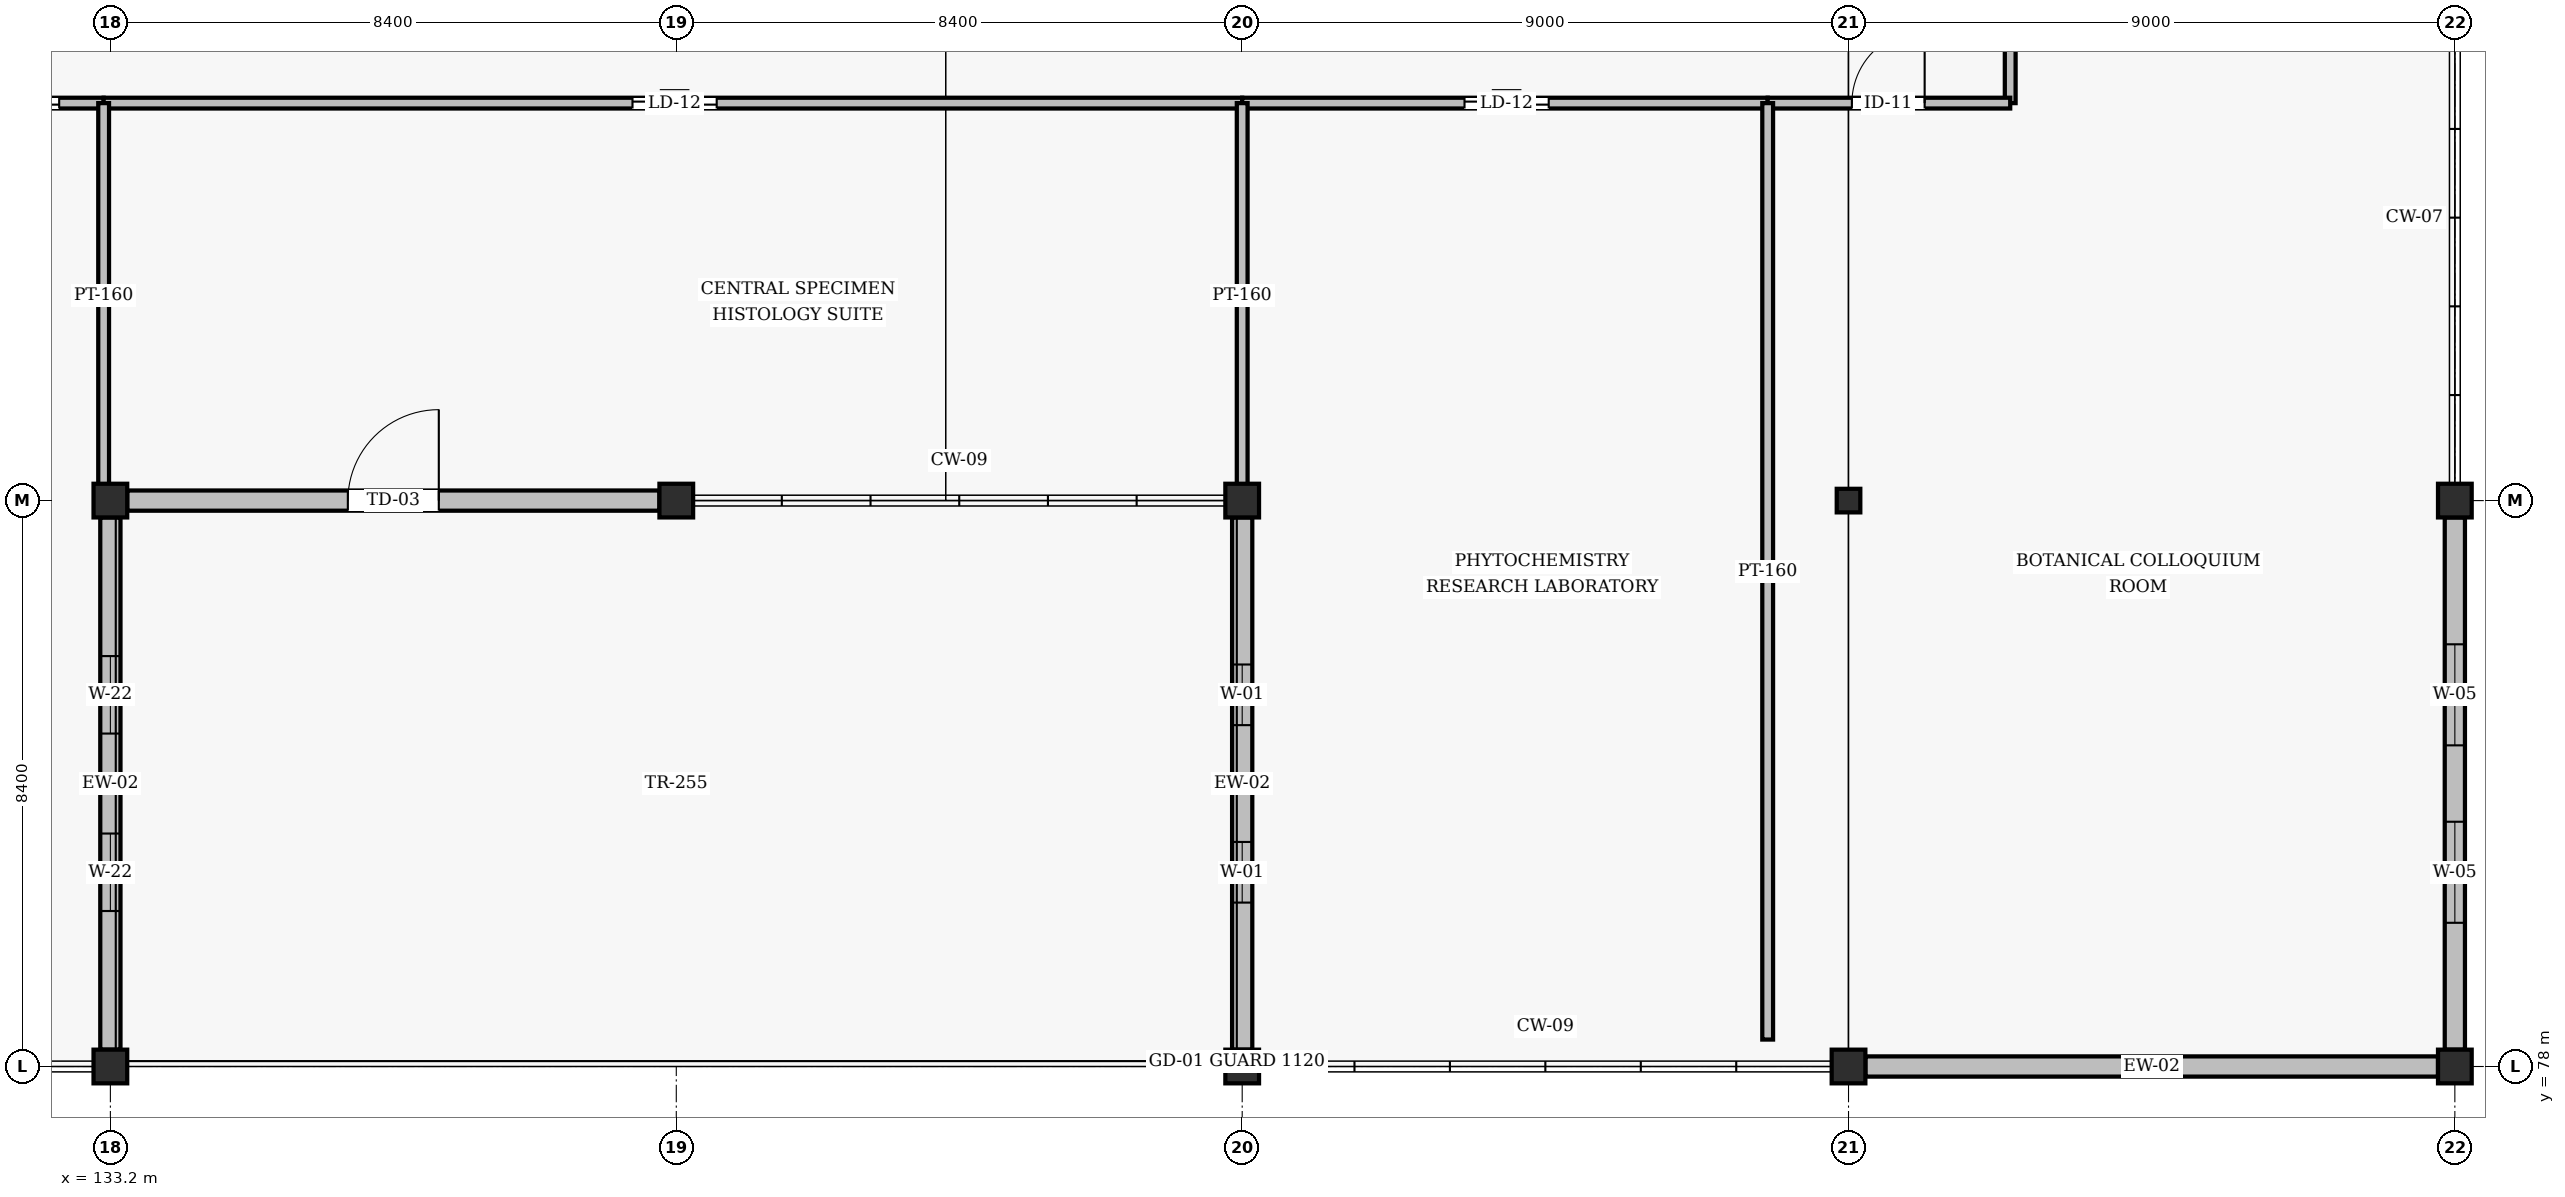
"""IFC4 building model, lengths in metres.
Left out: names, types, materials, properties, quantities, classifications, styles, units other than length and angle.
Written with IfcOpenShell. Run it as: python <this file> out.ifc"""

import sys

from ifc_helpers import new_model, si_unit, direction, frame, frame_2d, origin, origin_2d, place, context, subcontext, project, spatial, rectangle, hollow_rectangle, i_section, extrude, element, fill, save


model = new_model("IFC4")
c1 = context("Model", 3, precision=1e-05, world=origin(), true_north=direction((0.0, 1.0)))
c2 = subcontext(c1, "Body", "Model", "MODEL_VIEW")
j1 = project(units=[si_unit("LENGTHUNIT", "METRE"), si_unit("PLANEANGLEUNIT", "RADIAN")], contexts=[c1])
p1 = place(None, origin())
s1 = spatial("IfcSite", under=j1, at=p1, CompositionType="ELEMENT")
p2 = place(p1, origin())
s2 = spatial("IfcBuilding", under=s1, at=p2, CompositionType="ELEMENT")
p3 = place(p2, frame((0.0, 0.0, 28.2)))
s3 = spatial("IfcBuildingStorey", under=s2, at=p3, CompositionType="ELEMENT", Elevation=28.2)
for number, where, z_axis, x_axis in (
    (1, (133.2, 78.0, 0.0), (0.0, 0.0, 1.0), (1.0, 0.0, 0.0)),
    (2, (133.2, 86.4, 0.0), (0.0, 0.0, 1.0), (1.0, 0.0, 0.0)),
    (3, (141.6, 86.4, 0.0), (0.0, 0.0, 1.0), (1.0, 0.0, 0.0)),
    (4, (150.0, 78.0, 0.0), (0.0, 0.0, 1.0), (1.0, 0.0, 0.0)),
    (5, (150.0, 86.4, 0.0), (0.0, 0.0, 1.0), (1.0, 0.0, 0.0)),
    (6, (159.0, 78.0, 0.0), (0.0, 0.0, 1.0), (1.0, 0.0, 0.0)),
):
    element("IfcColumn", number, at=place(p3, frame(where, z_axis=z_axis, x_axis=x_axis)), inside=s3, PredefinedType="COLUMN", context=c2, shape_type="SweptSolid", body=[
        extrude(hollow_rectangle(XDim=0.5, YDim=0.5, WallThickness=0.02, InnerFilletRadius=0.02, OuterFilletRadius=0.04, at=origin_2d()), origin(), (0.0, 0.0, 1.0), 3.6),
    ])
p4 = place(p3, frame((159.0, 86.4, 0.0), z_axis=(0.0, 0.0, 1.0), x_axis=(1.0, 0.0, 0.0)))
e7 = element("IfcColumn", 7, at=p4, inside=s3, PredefinedType="COLUMN", context=c2, shape_type="SweptSolid", body=[
    extrude(i_section(OverallWidth=0.35, OverallDepth=0.35, WebThickness=0.012, FlangeThickness=0.019, FilletRadius=0.02, at=origin_2d()), origin(), (0.0, 0.0, 1.0), 3.6),
])
for number, where, z_axis, x_axis in (
    (8, (168.0, 78.0, 0.0), (0.0, 0.0, 1.0), (1.0, 0.0, 0.0)),
    (9, (168.0, 86.4, 0.0), (0.0, 0.0, 1.0), (1.0, 0.0, 0.0)),
):
    element("IfcColumn", number, at=place(p3, frame(where, z_axis=z_axis, x_axis=x_axis)), inside=s3, PredefinedType="COLUMN", context=c2, shape_type="SweptSolid", body=[
        extrude(hollow_rectangle(XDim=0.5, YDim=0.5, WallThickness=0.02, InnerFilletRadius=0.02, OuterFilletRadius=0.04, at=origin_2d()), origin(), (0.0, 0.0, 1.0), 3.6),
    ])
p5 = place(p3, frame((133.2, 78.25, 0.0), z_axis=(0.0, 0.0, 1.0), x_axis=(0.0, 1.0, 0.0)))
e10 = element("IfcWall", 10, at=p5, inside=s3, PredefinedType="SOLIDWALL", context=c2, shape_type="SweptSolid", body=[
    extrude(rectangle(XDim=7.9, YDim=0.3, at=frame_2d((3.95, 0.0))), origin(), (0.0, 0.0, 1.0), 2.852),
])
p6 = place(p5, frame((2.058, 0.0, 0.9)))
e11 = element("IfcOpeningElement", 11, at=p6, cuts=e10, PredefinedType="OPENING", context=c2, shape_type="SweptSolid", body=[
    extrude(rectangle(XDim=1.15, YDim=1.65, at=frame_2d((0.575, 0.825))), frame((0.0, 0.16, 0.0), z_axis=(0.0, -1.0, 0.0), x_axis=(1.0, 0.0, 0.0)), (0.0, 0.0, 1.0), 0.32),
])
p7 = place(p5, frame((4.692, 0.0, 0.9)))
e12 = element("IfcOpeningElement", 12, at=p7, cuts=e10, PredefinedType="OPENING", context=c2, shape_type="SweptSolid", body=[
    extrude(rectangle(XDim=1.15, YDim=1.65, at=frame_2d((0.575, 0.825))), frame((0.0, 0.16, 0.0), z_axis=(0.0, -1.0, 0.0), x_axis=(1.0, 0.0, 0.0)), (0.0, 0.0, 1.0), 0.32),
])
p8 = place(p3, frame((133.45, 86.4, 0.0), z_axis=(0.0, 0.0, 1.0), x_axis=(1.0, 0.0, 0.0)))
e13 = element("IfcWall", 13, at=p8, inside=s3, PredefinedType="SOLIDWALL", context=c2, shape_type="SweptSolid", body=[
    extrude(rectangle(XDim=7.9, YDim=0.3, at=frame_2d((3.95, 0.0))), origin(), (0.0, 0.0, 1.0), 2.852),
])
p9 = place(p8, frame((3.275, 0.0, 0.0)))
e14 = element("IfcOpeningElement", 14, at=p9, cuts=e13, PredefinedType="OPENING", context=c2, shape_type="SweptSolid", body=[
    extrude(rectangle(XDim=1.35, YDim=2.24, at=frame_2d((0.675, 1.12))), frame((0.0, 0.16, 0.0), z_axis=(0.0, -1.0, 0.0), x_axis=(1.0, 0.0, 0.0)), (0.0, 0.0, 1.0), 0.32),
])
p10 = place(p3, frame((150.0, 86.15, 0.0), z_axis=(0.0, 0.0, 1.0), x_axis=(0.0, -1.0, 0.0)))
e15 = element("IfcWall", 15, at=p10, inside=s3, PredefinedType="SOLIDWALL", context=c2, shape_type="SweptSolid", body=[
    extrude(rectangle(XDim=7.9, YDim=0.3, at=frame_2d((3.95, 0.0))), origin(), (0.0, 0.0, 1.0), 2.852),
])
p11 = place(p10, frame((2.183, 0.0, 0.95)))
e16 = element("IfcOpeningElement", 16, at=p11, cuts=e15, PredefinedType="OPENING", context=c2, shape_type="SweptSolid", body=[
    extrude(rectangle(XDim=0.9, YDim=1.6, at=frame_2d((0.45, 0.8))), frame((0.0, 0.16, 0.0), z_axis=(0.0, -1.0, 0.0), x_axis=(1.0, 0.0, 0.0)), (0.0, 0.0, 1.0), 0.32),
])
p12 = place(p10, frame((4.817, 0.0, 0.95)))
e17 = element("IfcOpeningElement", 17, at=p12, cuts=e15, PredefinedType="OPENING", context=c2, shape_type="SweptSolid", body=[
    extrude(rectangle(XDim=0.9, YDim=1.6, at=frame_2d((0.45, 0.8))), frame((0.0, 0.16, 0.0), z_axis=(0.0, -1.0, 0.0), x_axis=(1.0, 0.0, 0.0)), (0.0, 0.0, 1.0), 0.32),
])
p13 = place(p3, frame((159.25, 78.0, 0.0), z_axis=(0.0, 0.0, 1.0), x_axis=(1.0, 0.0, 0.0)))
e18 = element("IfcWall", 18, at=p13, inside=s3, PredefinedType="SOLIDWALL", context=c2, shape_type="SweptSolid", body=[
    extrude(rectangle(XDim=8.5, YDim=0.3, at=frame_2d((4.25, 0.0))), origin(), (0.0, 0.0, 1.0), 2.56),
])
p14 = place(p3, frame((168.0, 78.25, 0.0), z_axis=(0.0, 0.0, 1.0), x_axis=(0.0, 1.0, 0.0)))
e19 = element("IfcWall", 19, at=p14, inside=s3, PredefinedType="SOLIDWALL", context=c2, shape_type="SweptSolid", body=[
    extrude(rectangle(XDim=7.9, YDim=0.3, at=frame_2d((3.95, 0.0))), origin(), (0.0, 0.0, 1.0), 2.852),
])
p15 = place(p14, frame((1.883, 0.0, 0.85)))
e20 = element("IfcOpeningElement", 20, at=p15, cuts=e19, PredefinedType="OPENING", context=c2, shape_type="SweptSolid", body=[
    extrude(rectangle(XDim=1.5, YDim=1.7, at=frame_2d((0.75, 0.85))), frame((0.0, 0.16, 0.0), z_axis=(0.0, -1.0, 0.0), x_axis=(1.0, 0.0, 0.0)), (0.0, 0.0, 1.0), 0.32),
])
p16 = place(p14, frame((4.517, 0.0, 0.85)))
e21 = element("IfcOpeningElement", 21, at=p16, cuts=e19, PredefinedType="OPENING", context=c2, shape_type="SweptSolid", body=[
    extrude(rectangle(XDim=1.5, YDim=1.7, at=frame_2d((0.75, 0.85))), frame((0.0, 0.16, 0.0), z_axis=(0.0, -1.0, 0.0), x_axis=(1.0, 0.0, 0.0)), (0.0, 0.0, 1.0), 0.32),
])
p17 = place(p3, frame((161.4, 92.3, 0.0), z_axis=(0.0, 0.0, 1.0), x_axis=(0.0, 1.0, 0.0)))
e22 = element("IfcWall", 22, at=p17, inside=s3, PredefinedType="PARTITIONING", context=c2, shape_type="SweptSolid", body=[
    extrude(rectangle(XDim=14.1, YDim=0.16, at=frame_2d((7.05, 0.0))), origin(), (0.0, 0.0, 1.0), 2.752),
])
p18 = place(p17, frame((6.5, 0.0, 0.0)))
e23 = element("IfcOpeningElement", 23, at=p18, cuts=e22, PredefinedType="OPENING", context=c2, shape_type="SweptSolid", body=[
    extrude(rectangle(XDim=1.08, YDim=2.08, at=frame_2d((0.54, 1.04))), frame((0.0, 0.09, 0.0), z_axis=(0.0, -1.0, 0.0), x_axis=(1.0, 0.0, 0.0)), (0.0, 0.0, 1.0), 0.18),
])
p19 = place(p3, frame((130.6, 92.3, 0.0), z_axis=(0.0, 0.0, 1.0), x_axis=(1.0, 0.0, 0.0)))
e24 = element("IfcWall", 24, at=p19, inside=s3, PredefinedType="PARTITIONING", context=c2, shape_type="SweptSolid", body=[
    extrude(rectangle(XDim=2.5, YDim=0.16, at=frame_2d((1.25, 0.0))), origin(), (0.0, 0.0, 1.0), 3.352),
])
p20 = place(p19, frame((0.7, 0.0, 0.0)))
e25 = element("IfcOpeningElement", 25, at=p20, cuts=e24, PredefinedType="OPENING", context=c2, shape_type="SweptSolid", body=[
    extrude(rectangle(XDim=1.14, YDim=2.12, at=frame_2d((0.57, 1.06))), frame((0.0, 0.09, 0.0), z_axis=(0.0, -1.0, 0.0), x_axis=(1.0, 0.0, 0.0)), (0.0, 0.0, 1.0), 0.18),
])
p21 = place(p3, frame((133.1, 92.3, 0.0), z_axis=(0.0, 0.0, 1.0), x_axis=(1.0, 0.0, 0.0)))
e26 = element("IfcWall", 26, at=p21, inside=s3, PredefinedType="PARTITIONING", context=c2, shape_type="SweptSolid", body=[
    extrude(rectangle(XDim=16.9, YDim=0.16, at=frame_2d((8.45, 0.0))), origin(), (0.0, 0.0, 1.0), 2.852),
])
p22 = place(p21, frame((7.85, 0.0, 0.0)))
e27 = element("IfcOpeningElement", 27, at=p22, cuts=e26, PredefinedType="OPENING", context=c2, shape_type="SweptSolid", body=[
    extrude(rectangle(XDim=1.25, YDim=2.12, at=frame_2d((0.625, 1.06))), frame((0.0, 0.09, 0.0), z_axis=(0.0, -1.0, 0.0), x_axis=(1.0, 0.0, 0.0)), (0.0, 0.0, 1.0), 0.18),
])
p23 = place(p3, frame((150.0, 92.3, 0.0), z_axis=(0.0, 0.0, 1.0), x_axis=(1.0, 0.0, 0.0)))
e28 = element("IfcWall", 28, at=p23, inside=s3, PredefinedType="PARTITIONING", context=c2, shape_type="SweptSolid", body=[
    extrude(rectangle(XDim=7.8, YDim=0.16, at=frame_2d((3.9, 0.0))), origin(), (0.0, 0.0, 1.0), 3.352),
])
p24 = place(p23, frame((3.3, 0.0, 0.0)))
e29 = element("IfcOpeningElement", 29, at=p24, cuts=e28, PredefinedType="OPENING", context=c2, shape_type="SweptSolid", body=[
    extrude(rectangle(XDim=1.25, YDim=2.12, at=frame_2d((0.625, 1.06))), frame((0.0, 0.09, 0.0), z_axis=(0.0, -1.0, 0.0), x_axis=(1.0, 0.0, 0.0)), (0.0, 0.0, 1.0), 0.18),
])
p25 = place(p3, frame((157.8, 92.3, 0.0), z_axis=(0.0, 0.0, 1.0), x_axis=(1.0, 0.0, 0.0)))
e30 = element("IfcWall", 30, at=p25, inside=s3, PredefinedType="PARTITIONING", context=c2, shape_type="SweptSolid", body=[
    extrude(rectangle(XDim=3.6, YDim=0.16, at=frame_2d((1.8, 0.0))), origin(), (0.0, 0.0, 1.0), 2.852),
])
p26 = place(p25, frame((1.25, 0.0, 0.0)))
e31 = element("IfcOpeningElement", 31, at=p26, cuts=e30, PredefinedType="OPENING", context=c2, shape_type="SweptSolid", body=[
    extrude(rectangle(XDim=1.08, YDim=2.08, at=frame_2d((0.54, 1.04))), frame((0.0, 0.09, 0.0), z_axis=(0.0, -1.0, 0.0), x_axis=(1.0, 0.0, 0.0)), (0.0, 0.0, 1.0), 0.18),
])
for number, where, z_axis, x_axis in (
    (32, (133.1, 86.6, 0.0), (0.0, 0.0, 1.0), (0.0, 1.0, 0.0)),
    (33, (150.0, 86.6, 0.0), (0.0, 0.0, 1.0), (0.0, 1.0, 0.0)),
):
    element("IfcWall", number, at=place(p3, frame(where, z_axis=z_axis, x_axis=x_axis)), inside=s3, PredefinedType="PARTITIONING", context=c2, shape_type="SweptSolid", body=[
        extrude(rectangle(XDim=5.7, YDim=0.16, at=frame_2d((2.85, 0.0))), origin(), (0.0, 0.0, 1.0), 2.852),
    ])
p27 = place(p3, frame((157.8, 78.4, 0.0), z_axis=(0.0, 0.0, 1.0), x_axis=(0.0, 1.0, 0.0)))
e34 = element("IfcWall", 34, at=p27, inside=s3, PredefinedType="PARTITIONING", context=c2, shape_type="SweptSolid", body=[
    extrude(rectangle(XDim=13.9, YDim=0.16, at=frame_2d((6.95, 0.0))), origin(), (0.0, 0.0, 1.0), 2.752),
])
p28 = place(p6, origin())
e35 = element("IfcWindow", 35, at=p28, inside=s3, PartitioningType="SINGLE_PANEL", PredefinedType="WINDOW", context=c2, shape_type="SweptSolid", body=[
    extrude(rectangle(XDim=1.15, YDim=1.65, at=frame_2d((0.575, 0.825))), frame((0.0, 0.03, 0.0), z_axis=(0.0, -1.0, 0.0), x_axis=(1.0, 0.0, 0.0)), (0.0, 0.0, 1.0), 0.06),
])
fill(e11, e35)
p29 = place(p7, origin())
e36 = element("IfcWindow", 36, at=p29, inside=s3, PartitioningType="SINGLE_PANEL", PredefinedType="WINDOW", context=c2, shape_type="SweptSolid", body=[
    extrude(rectangle(XDim=1.15, YDim=1.65, at=frame_2d((0.575, 0.825))), frame((0.0, 0.03, 0.0), z_axis=(0.0, -1.0, 0.0), x_axis=(1.0, 0.0, 0.0)), (0.0, 0.0, 1.0), 0.06),
])
fill(e12, e36)
p30 = place(p9, frame((1.35, 0.0, 0.0), z_axis=(0.0, 0.0, 1.0), x_axis=(-1.0, 0.0, 0.0)))
e37 = element("IfcDoor", 37, at=p30, inside=s3, OperationType="SINGLE_SWING_RIGHT", PredefinedType="DOOR", context=c2, shape_type="SweptSolid", body=[
    extrude(rectangle(XDim=1.35, YDim=2.24, at=frame_2d((0.675, 1.12))), frame((0.0, 0.025, 0.0), z_axis=(0.0, -1.0, 0.0), x_axis=(1.0, 0.0, 0.0)), (0.0, 0.0, 1.0), 0.05),
])
fill(e14, e37)
p31 = place(p11, origin())
e38 = element("IfcWindow", 38, at=p31, inside=s3, PartitioningType="SINGLE_PANEL", PredefinedType="WINDOW", context=c2, shape_type="SweptSolid", body=[
    extrude(rectangle(XDim=0.9, YDim=1.6, at=frame_2d((0.45, 0.8))), frame((0.0, 0.03, 0.0), z_axis=(0.0, -1.0, 0.0), x_axis=(1.0, 0.0, 0.0)), (0.0, 0.0, 1.0), 0.06),
])
fill(e16, e38)
p32 = place(p12, origin())
e39 = element("IfcWindow", 39, at=p32, inside=s3, PartitioningType="SINGLE_PANEL", PredefinedType="WINDOW", context=c2, shape_type="SweptSolid", body=[
    extrude(rectangle(XDim=0.9, YDim=1.6, at=frame_2d((0.45, 0.8))), frame((0.0, 0.03, 0.0), z_axis=(0.0, -1.0, 0.0), x_axis=(1.0, 0.0, 0.0)), (0.0, 0.0, 1.0), 0.06),
])
fill(e17, e39)
p33 = place(p15, origin())
e40 = element("IfcWindow", 40, at=p33, inside=s3, PartitioningType="SINGLE_PANEL", PredefinedType="WINDOW", context=c2, shape_type="SweptSolid", body=[
    extrude(rectangle(XDim=1.5, YDim=1.7, at=frame_2d((0.75, 0.85))), frame((0.0, 0.03, 0.0), z_axis=(0.0, -1.0, 0.0), x_axis=(1.0, 0.0, 0.0)), (0.0, 0.0, 1.0), 0.06),
])
fill(e20, e40)
p34 = place(p16, origin())
e41 = element("IfcWindow", 41, at=p34, inside=s3, PartitioningType="SINGLE_PANEL", PredefinedType="WINDOW", context=c2, shape_type="SweptSolid", body=[
    extrude(rectangle(XDim=1.5, YDim=1.7, at=frame_2d((0.75, 0.85))), frame((0.0, 0.03, 0.0), z_axis=(0.0, -1.0, 0.0), x_axis=(1.0, 0.0, 0.0)), (0.0, 0.0, 1.0), 0.06),
])
fill(e21, e41)
p35 = place(p20, origin())
e42 = element("IfcDoor", 42, at=p35, inside=s3, OperationType="SINGLE_SWING_RIGHT", PredefinedType="DOOR", context=c2, shape_type="SweptSolid", body=[
    extrude(rectangle(XDim=1.14, YDim=2.12, at=frame_2d((0.57, 1.06))), frame((0.0, 0.025, 0.0), z_axis=(0.0, -1.0, 0.0), x_axis=(1.0, 0.0, 0.0)), (0.0, 0.0, 1.0), 0.05),
])
fill(e25, e42)
p36 = place(p22, origin())
e43 = element("IfcDoor", 43, at=p36, inside=s3, OperationType="SINGLE_SWING_LEFT", PredefinedType="DOOR", context=c2, shape_type="SweptSolid", body=[
    extrude(rectangle(XDim=1.25, YDim=2.12, at=frame_2d((0.625, 1.06))), frame((0.0, 0.025, 0.0), z_axis=(0.0, -1.0, 0.0), x_axis=(1.0, 0.0, 0.0)), (0.0, 0.0, 1.0), 0.05),
])
fill(e27, e43)
p37 = place(p24, origin())
e44 = element("IfcDoor", 44, at=p37, inside=s3, OperationType="SINGLE_SWING_LEFT", PredefinedType="DOOR", context=c2, shape_type="SweptSolid", body=[
    extrude(rectangle(XDim=1.25, YDim=2.12, at=frame_2d((0.625, 1.06))), frame((0.0, 0.025, 0.0), z_axis=(0.0, -1.0, 0.0), x_axis=(1.0, 0.0, 0.0)), (0.0, 0.0, 1.0), 0.05),
])
fill(e29, e44)
p38 = place(p26, origin())
e45 = element("IfcDoor", 45, at=p38, inside=s3, OperationType="SINGLE_SWING_RIGHT", PredefinedType="DOOR", context=c2, shape_type="SweptSolid", body=[
    extrude(rectangle(XDim=1.08, YDim=2.08, at=frame_2d((0.54, 1.04))), frame((0.0, 0.025, 0.0), z_axis=(0.0, -1.0, 0.0), x_axis=(1.0, 0.0, 0.0)), (0.0, 0.0, 1.0), 0.05),
])
fill(e31, e45)
save(model, sys.argv[1])
